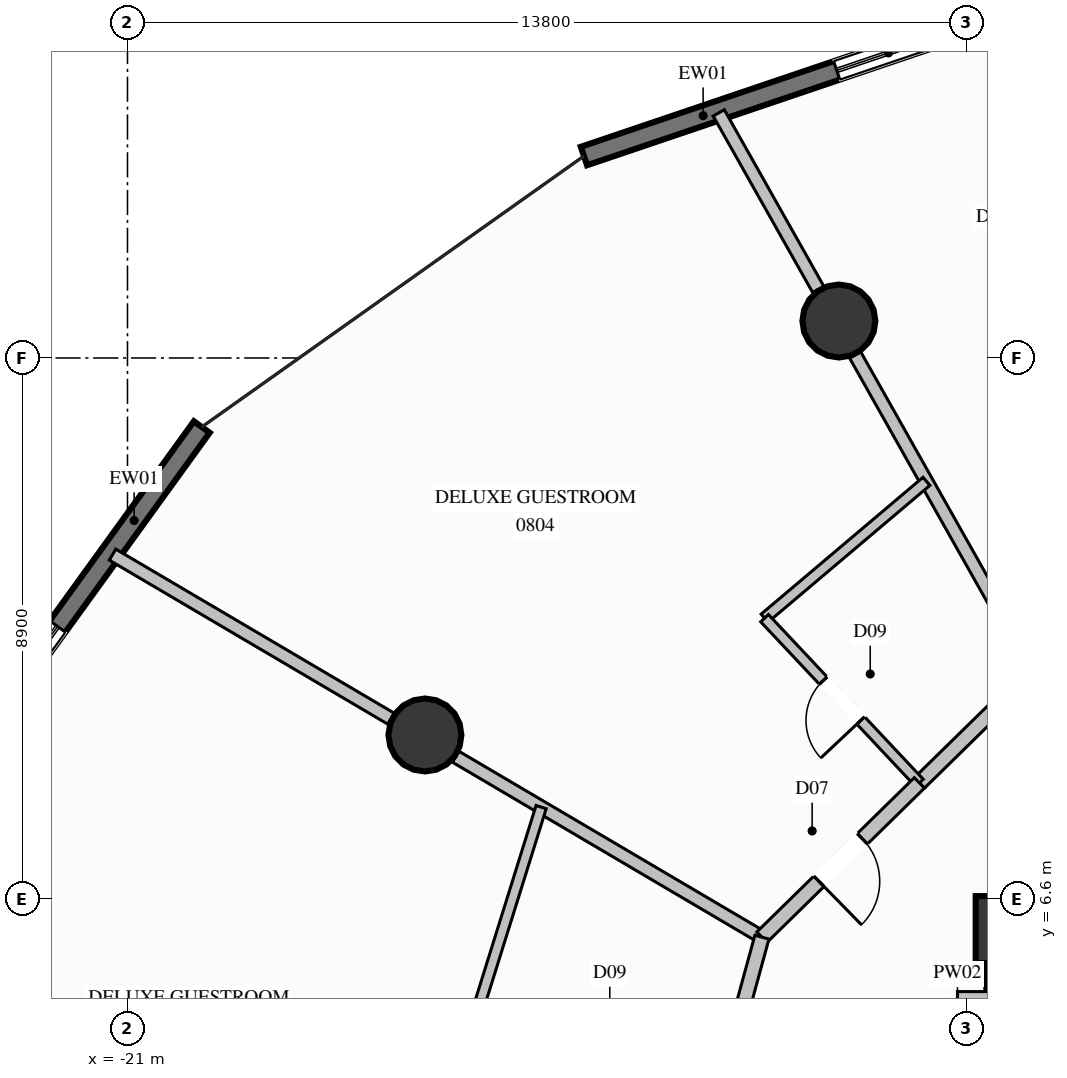
"""IFC4 building model, lengths in metres.
Left out: names, types, materials, properties, quantities, classifications, styles, units other than length and angle.
Written with IfcOpenShell. Run it as: python <this file> out.ifc"""

import sys

from ifc_helpers import new_model, si_unit, direction, frame, frame_2d, origin, origin_2d, place, context, subcontext, project, spatial, rectangle, circle, extrude, element, fill, save


model = new_model("IFC4")
c1 = context("Model", 3, precision=1e-05, world=origin(), true_north=direction((0.0, 1.0)))
c2 = subcontext(c1, "Body", "Model", "MODEL_VIEW")
j1 = project(units=[si_unit("LENGTHUNIT", "METRE"), si_unit("PLANEANGLEUNIT", "RADIAN")], contexts=[c1])
p1 = place(None, origin())
s1 = spatial("IfcSite", under=j1, at=p1, CompositionType="ELEMENT")
p2 = place(p1, origin())
s2 = spatial("IfcBuilding", under=s1, at=p2, CompositionType="ELEMENT")
p3 = place(p2, frame((0.0, 0.0, 32.0)))
s3 = spatial("IfcBuildingStorey", under=s2, at=p3, CompositionType="ELEMENT", Elevation=32.0)
p4 = place(p3, frame((-6.5, 6.1, 0.0), z_axis=(0.0, 0.0, 1.0), x_axis=(1.0, 0.0, 0.0)))
e1 = element("IfcColumn", 1, at=p4, inside=s3, PredefinedType="COLUMN", context=c2, shape_type="SweptSolid", body=[
    extrude(rectangle(XDim=1.1, YDim=1.1, at=origin_2d()), origin(), (0.0, 0.0, 1.0), 3.6),
])
p5 = place(p3, frame((-6.5, 2.35, 0.0), z_axis=(0.0, 0.0, 1.0), x_axis=(0.0, 1.0, 0.0)))
e2 = element("IfcWall", 2, at=p5, inside=s3, PredefinedType="SHEAR", context=c2, shape_type="SweptSolid", body=[
    extrude(rectangle(XDim=4.125, YDim=0.75, at=frame_2d((2.062, 0.0))), origin(), (0.0, 0.0, 1.0), 3.6),
])
for number, where, z_axis, x_axis in (
    (3, (-9.3, 16.108, 0.0), (0.0, 0.0, 1.0), (1.0, 0.0, 0.0)),
    (4, (-16.108, 9.3, 0.0), (0.0, 0.0, 1.0), (1.0, 0.0, 0.0)),
):
    element("IfcColumn", number, at=place(p3, frame(where, z_axis=z_axis, x_axis=x_axis)), inside=s3, PredefinedType="COLUMN", context=c2, shape_type="SweptSolid", body=[
        extrude(circle(Radius=0.6, at=origin_2d()), origin(), (0.0, 0.0, 1.0), 3.6),
    ])
p6 = place(p3, frame((-13.493, 18.821, 0.0), z_axis=(0.0, 0.0, 1.0), x_axis=(0.94717495877, 0.320717317085, 0.0)))
e5 = element("IfcWall", 5, at=p6, inside=s3, PredefinedType="SOLIDWALL", context=c2, shape_type="SweptSolid", body=[
    extrude(rectangle(XDim=8.151, YDim=0.32, at=frame_2d((4.075, 0.0))), origin(), (0.0, 0.0, 1.0), 3.34),
])
p7 = place(p6, frame((4.389, 0.0, 0.35)))
e6 = element("IfcOpeningElement", 6, at=p7, cuts=e5, PredefinedType="OPENING", context=c2, shape_type="SweptSolid", body=[
    extrude(rectangle(XDim=1.8, YDim=2.6, at=frame_2d((0.9, 1.3))), frame((0.0, 0.17, 0.0), z_axis=(0.0, -1.0, 0.0), x_axis=(1.0, 0.0, 0.0)), (0.0, 0.0, 1.0), 0.34),
])
p8 = place(p3, frame((-24.016, 8.503, 0.0), z_axis=(0.0, 0.0, 1.0), x_axis=(0.585883584877, 0.810395227634, 0.0)))
e7 = element("IfcWall", 7, at=p8, inside=s3, PredefinedType="SOLIDWALL", context=c2, shape_type="SweptSolid", body=[
    extrude(rectangle(XDim=7.234, YDim=0.32, at=frame_2d((3.617, 0.0))), origin(), (0.0, 0.0, 1.0), 3.34),
])
p9 = place(p8, frame((1.386, 0.0, 0.35)))
e8 = element("IfcOpeningElement", 8, at=p9, cuts=e7, PredefinedType="OPENING", context=c2, shape_type="SweptSolid", body=[
    extrude(rectangle(XDim=1.8, YDim=2.6, at=frame_2d((0.9, 1.3))), frame((0.0, 0.17, 0.0), z_axis=(0.0, -1.0, 0.0), x_axis=(1.0, 0.0, 0.0)), (0.0, 0.0, 1.0), 0.34),
])
p10 = place(p3, frame((-7.35, 4.95, 0.0), z_axis=(0.0, 0.0, 1.0), x_axis=(1.0, 0.0, 0.0)))
e9 = element("IfcWall", 9, at=p10, inside=s3, PredefinedType="PARTITIONING", context=c2, shape_type="SweptSolid", body=[
    extrude(rectangle(XDim=0.93, YDim=0.26, at=frame_2d((0.465, 0.0))), origin(), (0.0, 0.0, 1.0), 3.34),
])
p11 = place(p3, frame((-6.1, 10.349, 0.0), z_axis=(0.0, 0.0, 1.0), x_axis=(-0.491140594116, 0.871080315936, 0.0)))
e10 = element("IfcWall", 10, at=p11, inside=s3, PredefinedType="PARTITIONING", context=c2, shape_type="SweptSolid", body=[
    extrude(rectangle(XDim=5.969, YDim=0.21, at=frame_2d((2.985, 0.0))), origin(), (0.0, 0.0, 1.0), 2.709),
])
p12 = place(p3, frame((-9.639, 16.627, 0.0), z_axis=(0.0, 0.0, 1.0), x_axis=(-0.491168715891, 0.871064459457, 0.0)))
e11 = element("IfcWall", 11, at=p12, inside=s3, PredefinedType="PARTITIONING", context=c2, shape_type="SweptSolid", body=[
    extrude(rectangle(XDim=3.333, YDim=0.21, at=frame_2d((1.667, 0.0))), origin(), (0.0, 0.0, 1.0), 3.34),
])
p13 = place(p3, frame((-10.566, 5.975, 0.0), z_axis=(0.0, 0.0, 1.0), x_axis=(-0.86160761681, 0.507574935014, 0.0)))
e12 = element("IfcWall", 12, at=p13, inside=s3, PredefinedType="PARTITIONING", context=c2, shape_type="SweptSolid", body=[
    extrude(rectangle(XDim=5.845, YDim=0.21, at=frame_2d((2.922, 0.0))), origin(), (0.0, 0.0, 1.0), 2.709),
])
p14 = place(p3, frame((-16.667, 9.569, 0.0), z_axis=(0.0, 0.0, 1.0), x_axis=(-0.861651827739, 0.50749987956, 0.0)))
e13 = element("IfcWall", 13, at=p14, inside=s3, PredefinedType="PARTITIONING", context=c2, shape_type="SweptSolid", body=[
    extrude(rectangle(XDim=5.314, YDim=0.21, at=frame_2d((2.657, 0.0))), origin(), (0.0, 0.0, 1.0), 3.34),
])
p15 = place(p3, frame((-6.1, 10.349, 0.0), z_axis=(0.0, 0.0, 1.0), x_axis=(-0.714460071513, -0.69967621527, 0.0)))
e14 = element("IfcWall", 14, at=p15, inside=s3, PredefinedType="PARTITIONING", context=c2, shape_type="SweptSolid", body=[
    extrude(rectangle(XDim=2.626, YDim=0.24, at=frame_2d((1.313, 0.0))), origin(), (0.0, 0.0, 1.0), 3.34),
])
p16 = place(p3, frame((-7.86, 13.471, 0.0), z_axis=(0.0, 0.0, 1.0), x_axis=(-0.763718302061, -0.645549653471, 0.0)))
e15 = element("IfcWall", 15, at=p16, inside=s3, PredefinedType="PLUMBINGWALL", context=c2, shape_type="SweptSolid", body=[
    extrude(rectangle(XDim=3.485, YDim=0.175, at=frame_2d((1.743, 0.0))), origin(), (0.0, 0.0, 1.0), 3.34),
])
p17 = place(p3, frame((-7.976, 8.512, 0.0), z_axis=(0.0, 0.0, 1.0), x_axis=(-0.684831906404, 0.72870107724, 0.0)))
e16 = element("IfcWall", 16, at=p17, inside=s3, PredefinedType="PLUMBINGWALL", context=c2, shape_type="SweptSolid", body=[
    extrude(rectangle(XDim=3.718, YDim=0.175, at=frame_2d((1.859, 0.0))), origin(), (0.0, 0.0, 1.0), 3.34),
])
p18 = place(p17, frame((1.409, 0.0, 0.0)))
e17 = element("IfcOpeningElement", 17, at=p18, cuts=e16, PredefinedType="OPENING", context=c2, shape_type="SweptSolid", body=[
    extrude(rectangle(XDim=0.9, YDim=2.1, at=frame_2d((0.45, 1.05))), frame((0.0, 0.098, 0.0), z_axis=(0.0, -1.0, 0.0), x_axis=(1.0, 0.0, 0.0)), (0.0, 0.0, 1.0), 0.195),
])
p19 = place(p3, frame((-7.976, 8.512, 0.0), z_axis=(0.0, 0.0, 1.0), x_axis=(-0.714375756875, -0.699762301064, 0.0)))
e18 = element("IfcWall", 18, at=p19, inside=s3, PredefinedType="PARTITIONING", context=c2, shape_type="SweptSolid", body=[
    extrude(rectangle(XDim=3.625, YDim=0.24, at=frame_2d((1.812, 0.0))), origin(), (0.0, 0.0, 1.0), 3.34),
])
p20 = place(p19, frame((1.313, 0.0, 0.0)))
e19 = element("IfcOpeningElement", 19, at=p20, cuts=e18, PredefinedType="OPENING", context=c2, shape_type="SweptSolid", body=[
    extrude(rectangle(XDim=1.0, YDim=2.2, at=frame_2d((0.5, 1.1))), frame((0.0, 0.13, 0.0), z_axis=(0.0, -1.0, 0.0), x_axis=(1.0, 0.0, 0.0)), (0.0, 0.0, 1.0), 0.26),
])
p21 = place(p3, frame((-10.566, 5.975, 0.0), z_axis=(0.0, 0.0, 1.0), x_axis=(-0.263744763784, -0.964592504416, 0.0)))
e20 = element("IfcWall", 20, at=p21, inside=s3, PredefinedType="PARTITIONING", context=c2, shape_type="SweptSolid", body=[
    extrude(rectangle(XDim=2.601, YDim=0.24, at=frame_2d((1.301, 0.0))), origin(), (0.0, 0.0, 1.0), 3.34),
])
p22 = place(p3, frame((-14.197, 8.114, 0.0), z_axis=(0.0, 0.0, 1.0), x_axis=(-0.298014103634, -0.954561466871, 0.0)))
e21 = element("IfcWall", 21, at=p22, inside=s3, PredefinedType="PLUMBINGWALL", context=c2, shape_type="SweptSolid", body=[
    extrude(rectangle(XDim=3.57, YDim=0.175, at=frame_2d((1.785, 0.0))), origin(), (0.0, 0.0, 1.0), 3.34),
])
p23 = place(p7, origin())
e22 = element("IfcWindow", 22, at=p23, inside=s3, PartitioningType="SINGLE_PANEL", PredefinedType="WINDOW", context=c2, shape_type="SweptSolid", body=[
    extrude(rectangle(XDim=1.8, YDim=2.6, at=frame_2d((0.9, 1.3))), frame((0.0, 0.03, 0.0), z_axis=(0.0, -1.0, 0.0), x_axis=(1.0, 0.0, 0.0)), (0.0, 0.0, 1.0), 0.06),
])
fill(e6, e22)
p24 = place(p9, origin())
e23 = element("IfcWindow", 23, at=p24, inside=s3, PartitioningType="SINGLE_PANEL", PredefinedType="WINDOW", context=c2, shape_type="SweptSolid", body=[
    extrude(rectangle(XDim=1.8, YDim=2.6, at=frame_2d((0.9, 1.3))), frame((0.0, 0.03, 0.0), z_axis=(0.0, -1.0, 0.0), x_axis=(1.0, 0.0, 0.0)), (0.0, 0.0, 1.0), 0.06),
])
fill(e8, e23)
p25 = place(p18, origin())
e24 = element("IfcDoor", 24, at=p25, inside=s3, OperationType="SINGLE_SWING_LEFT", PredefinedType="DOOR", context=c2, shape_type="SweptSolid", body=[
    extrude(rectangle(XDim=0.9, YDim=2.1, at=frame_2d((0.45, 1.05))), frame((0.0, 0.025, 0.0), z_axis=(0.0, -1.0, 0.0), x_axis=(1.0, 0.0, 0.0)), (0.0, 0.0, 1.0), 0.05),
])
fill(e17, e24)
p26 = place(p20, origin())
e25 = element("IfcDoor", 25, at=p26, inside=s3, OperationType="SINGLE_SWING_RIGHT", PredefinedType="DOOR", context=c2, shape_type="SweptSolid", body=[
    extrude(rectangle(XDim=1.0, YDim=2.2, at=frame_2d((0.5, 1.1))), frame((0.0, 0.025, 0.0), z_axis=(0.0, -1.0, 0.0), x_axis=(1.0, 0.0, 0.0)), (0.0, 0.0, 1.0), 0.05),
])
fill(e19, e25)
save(model, sys.argv[1])
